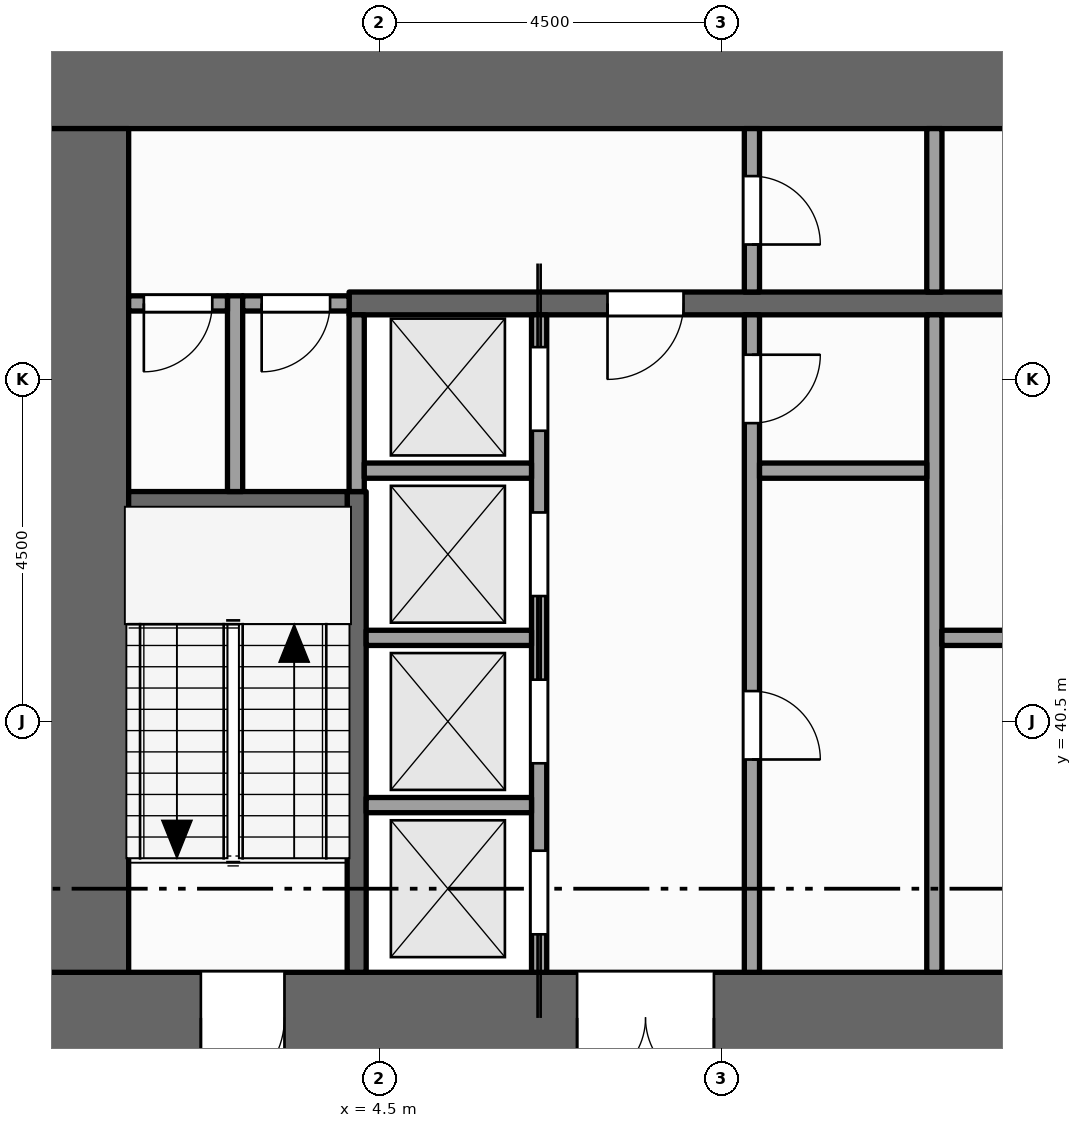
"""IFC4 building model, lengths in metres.
Left out: names, types, materials, properties, quantities, classifications, styles, units other than length and angle.
Written with IfcOpenShell. Run it as: python <this file> out.ifc"""

import sys

from ifc_helpers import new_model, si_unit, direction, frame, frame_2d, origin, place, context, subcontext, project, spatial, rectangle, extrude, element, fill, save


model = new_model("IFC4")
c1 = context("Model", 3, precision=1e-05, world=origin(), true_north=direction((0.0, 1.0)))
c2 = subcontext(c1, "Body", "Model", "MODEL_VIEW")
j1 = project(units=[si_unit("LENGTHUNIT", "METRE"), si_unit("PLANEANGLEUNIT", "RADIAN")], contexts=[c1])
p1 = place(None, origin())
s1 = spatial("IfcSite", under=j1, at=p1, CompositionType="ELEMENT")
p2 = place(p1, origin())
s2 = spatial("IfcBuilding", under=s1, at=p2, CompositionType="ELEMENT")
p3 = place(p2, frame((0.0, 0.0, 29.0)))
s3 = spatial("IfcBuildingStorey", under=s2, at=p3, CompositionType="ELEMENT", Elevation=29.0)
p4 = place(p3, frame((0.0, 36.6, -0.15), z_axis=(0.0, 0.0, 1.0), x_axis=(1.0, 0.0, 0.0)))
e1 = element("IfcWall", 1, at=p4, inside=s3, PredefinedType="SHEAR", context=c2, shape_type="SweptSolid", body=[
    extrude(rectangle(XDim=22.5, YDim=1.2, at=frame_2d((11.25, 0.0))), origin(), (0.0, 0.0, 1.0), 4.0),
])
p5 = place(p4, frame((7.1, 0.0, 0.15)))
e2 = element("IfcOpeningElement", 2, at=p5, cuts=e1, PredefinedType="OPENING", context=c2, shape_type="SweptSolid", body=[
    extrude(rectangle(XDim=1.8, YDim=2.1, at=frame_2d((0.9, 1.05))), frame((0.0, 0.61, 0.0), z_axis=(0.0, -1.0, 0.0), x_axis=(1.0, 0.0, 0.0)), (0.0, 0.0, 1.0), 1.22),
])
p6 = place(p4, frame((13.15, 0.0, 0.15)))
e3 = element("IfcOpeningElement", 3, at=p6, cuts=e1, PredefinedType="OPENING", context=c2, shape_type="SweptSolid", body=[
    extrude(rectangle(XDim=1.1, YDim=2.1, at=frame_2d((0.55, 1.05))), frame((0.0, 0.61, 0.0), z_axis=(0.0, -1.0, 0.0), x_axis=(1.0, 0.0, 0.0)), (0.0, 0.0, 1.0), 1.22),
])
p7 = place(p4, frame((2.15, 0.0, 0.15)))
e4 = element("IfcOpeningElement", 4, at=p7, cuts=e1, PredefinedType="OPENING", context=c2, shape_type="SweptSolid", body=[
    extrude(rectangle(XDim=1.1, YDim=2.1, at=frame_2d((0.55, 1.05))), frame((0.0, 0.61, 0.0), z_axis=(0.0, -1.0, 0.0), x_axis=(1.0, 0.0, 0.0)), (0.0, 0.0, 1.0), 1.22),
])
p8 = place(p4, frame((19.35, 0.0, 0.15)))
e5 = element("IfcOpeningElement", 5, at=p8, cuts=e1, PredefinedType="OPENING", context=c2, shape_type="SweptSolid", body=[
    extrude(rectangle(XDim=1.1, YDim=2.1, at=frame_2d((0.55, 1.05))), frame((0.0, 0.61, 0.0), z_axis=(0.0, -1.0, 0.0), x_axis=(1.0, 0.0, 0.0)), (0.0, 0.0, 1.0), 1.22),
])
p9 = place(p3, frame((0.0, 48.9, -0.15), z_axis=(0.0, 0.0, 1.0), x_axis=(1.0, 0.0, 0.0)))
e6 = element("IfcWall", 6, at=p9, inside=s3, PredefinedType="SHEAR", context=c2, shape_type="SweptSolid", body=[
    extrude(rectangle(XDim=22.5, YDim=1.2, at=frame_2d((11.25, 0.0))), origin(), (0.0, 0.0, 1.0), 4.0),
])
p10 = place(p3, frame((0.6, 37.2, -0.15), z_axis=(0.0, 0.0, 1.0), x_axis=(0.0, 1.0, 0.0)))
e7 = element("IfcWall", 7, at=p10, inside=s3, PredefinedType="SHEAR", context=c2, shape_type="SweptSolid", body=[
    extrude(rectangle(XDim=11.1, YDim=1.2, at=frame_2d((5.55, 0.0))), origin(), (0.0, 0.0, 1.0), 4.0),
])
p11 = place(p3, frame((2.6, 43.525, 0.0), z_axis=(0.0, 0.0, 1.0), x_axis=(0.0, 1.0, 0.0)))
e8 = element("IfcWall", 8, at=p11, inside=s3, PredefinedType="PARTITIONING", context=c2, shape_type="SweptSolid", body=[
    extrude(rectangle(XDim=2.575, YDim=0.2, at=frame_2d((1.288, 0.0))), origin(), (0.0, 0.0, 1.0), 3.85),
])
p12 = place(p3, frame((4.2, 37.2, 0.0), z_axis=(0.0, 0.0, 1.0), x_axis=(0.0, 1.0, 0.0)))
e9 = element("IfcWall", 9, at=p12, inside=s3, PredefinedType="SHEAR", context=c2, shape_type="SweptSolid", body=[
    extrude(rectangle(XDim=6.325, YDim=0.25, at=frame_2d((3.163, 0.0))), origin(), (0.0, 0.0, 1.0), 3.85),
])
p13 = place(p3, frame((4.2, 43.525, 0.0), z_axis=(0.0, 0.0, 1.0), x_axis=(0.0, 1.0, 0.0)))
e10 = element("IfcWall", 10, at=p13, inside=s3, PredefinedType="SOLIDWALL", context=c2, shape_type="SweptSolid", body=[
    extrude(rectangle(XDim=2.325, YDim=0.2, at=frame_2d((1.163, 0.0))), origin(), (0.0, 0.0, 1.0), 3.85),
])
p14 = place(p3, frame((6.6, 37.2, 0.0), z_axis=(0.0, 0.0, 1.0), x_axis=(0.0, 1.0, 0.0)))
e11 = element("IfcWall", 11, at=p14, inside=s3, PredefinedType="SOLIDWALL", context=c2, shape_type="SweptSolid", body=[
    extrude(rectangle(XDim=8.65, YDim=0.2, at=frame_2d((4.325, 0.0))), origin(), (0.0, 0.0, 1.0), 3.85),
])
p15 = place(p14, frame((0.5, 0.0, 0.012)))
e12 = element("IfcOpeningElement", 12, at=p15, cuts=e11, PredefinedType="OPENING", context=c2, shape_type="SweptSolid", body=[
    extrude(rectangle(XDim=1.1, YDim=2.1, at=frame_2d((0.55, 1.05))), frame((0.0, 0.11, 0.0), z_axis=(0.0, -1.0, 0.0), x_axis=(1.0, 0.0, 0.0)), (0.0, 0.0, 1.0), 0.22),
])
p16 = place(p14, frame((2.75, 0.0, 0.012)))
e13 = element("IfcOpeningElement", 13, at=p16, cuts=e11, PredefinedType="OPENING", context=c2, shape_type="SweptSolid", body=[
    extrude(rectangle(XDim=1.1, YDim=2.1, at=frame_2d((0.55, 1.05))), frame((0.0, 0.11, 0.0), z_axis=(0.0, -1.0, 0.0), x_axis=(1.0, 0.0, 0.0)), (0.0, 0.0, 1.0), 0.22),
])
p17 = place(p14, frame((4.95, 0.0, 0.012)))
e14 = element("IfcOpeningElement", 14, at=p17, cuts=e11, PredefinedType="OPENING", context=c2, shape_type="SweptSolid", body=[
    extrude(rectangle(XDim=1.1, YDim=2.1, at=frame_2d((0.55, 1.05))), frame((0.0, 0.11, 0.0), z_axis=(0.0, -1.0, 0.0), x_axis=(1.0, 0.0, 0.0)), (0.0, 0.0, 1.0), 0.22),
])
p18 = place(p14, frame((7.125, 0.0, 0.012)))
e15 = element("IfcOpeningElement", 15, at=p18, cuts=e11, PredefinedType="OPENING", context=c2, shape_type="SweptSolid", body=[
    extrude(rectangle(XDim=1.1, YDim=2.1, at=frame_2d((0.55, 1.05))), frame((0.0, 0.11, 0.0), z_axis=(0.0, -1.0, 0.0), x_axis=(1.0, 0.0, 0.0)), (0.0, 0.0, 1.0), 0.22),
])
p19 = place(p3, frame((9.4, 37.2, 0.0), z_axis=(0.0, 0.0, 1.0), x_axis=(0.0, 1.0, 0.0)))
e16 = element("IfcWall", 16, at=p19, inside=s3, PredefinedType="PARTITIONING", context=c2, shape_type="SweptSolid", body=[
    extrude(rectangle(XDim=8.65, YDim=0.2, at=frame_2d((4.325, 0.0))), origin(), (0.0, 0.0, 1.0), 3.85),
])
p20 = place(p19, frame((2.8, 0.0, 0.0)))
e17 = element("IfcOpeningElement", 17, at=p20, cuts=e16, PredefinedType="OPENING", context=c2, shape_type="SweptSolid", body=[
    extrude(rectangle(XDim=0.9, YDim=2.1, at=frame_2d((0.45, 1.05))), frame((0.0, 0.11, 0.0), z_axis=(0.0, -1.0, 0.0), x_axis=(1.0, 0.0, 0.0)), (0.0, 0.0, 1.0), 0.22),
])
p21 = place(p19, frame((7.225, 0.0, 0.0)))
e18 = element("IfcOpeningElement", 18, at=p21, cuts=e16, PredefinedType="OPENING", context=c2, shape_type="SweptSolid", body=[
    extrude(rectangle(XDim=0.9, YDim=2.1, at=frame_2d((0.45, 1.05))), frame((0.0, 0.11, 0.0), z_axis=(0.0, -1.0, 0.0), x_axis=(1.0, 0.0, 0.0)), (0.0, 0.0, 1.0), 0.22),
])
p22 = place(p3, frame((9.4, 46.15, 0.0), z_axis=(0.0, 0.0, 1.0), x_axis=(0.0, 1.0, 0.0)))
e19 = element("IfcWall", 19, at=p22, inside=s3, PredefinedType="PARTITIONING", context=c2, shape_type="SweptSolid", body=[
    extrude(rectangle(XDim=2.15, YDim=0.2, at=frame_2d((1.075, 0.0))), origin(), (0.0, 0.0, 1.0), 3.85),
])
p23 = place(p22, frame((0.625, 0.0, 0.0)))
e20 = element("IfcOpeningElement", 20, at=p23, cuts=e19, PredefinedType="OPENING", context=c2, shape_type="SweptSolid", body=[
    extrude(rectangle(XDim=0.9, YDim=2.1, at=frame_2d((0.45, 1.05))), frame((0.0, 0.11, 0.0), z_axis=(0.0, -1.0, 0.0), x_axis=(1.0, 0.0, 0.0)), (0.0, 0.0, 1.0), 0.22),
])
p24 = place(p3, frame((11.8, 37.2, 0.0), z_axis=(0.0, 0.0, 1.0), x_axis=(0.0, 1.0, 0.0)))
e21 = element("IfcWall", 21, at=p24, inside=s3, PredefinedType="PARTITIONING", context=c2, shape_type="SweptSolid", body=[
    extrude(rectangle(XDim=8.65, YDim=0.2, at=frame_2d((4.325, 0.0))), origin(), (0.0, 0.0, 1.0), 3.85),
])
p25 = place(p3, frame((11.8, 46.15, 0.0), z_axis=(0.0, 0.0, 1.0), x_axis=(0.0, 1.0, 0.0)))
e22 = element("IfcWall", 22, at=p25, inside=s3, PredefinedType="PARTITIONING", context=c2, shape_type="SweptSolid", body=[
    extrude(rectangle(XDim=2.15, YDim=0.2, at=frame_2d((1.075, 0.0))), origin(), (0.0, 0.0, 1.0), 3.85),
])
for number, where, z_axis, x_axis in (
    (23, (4.325, 39.4, 0.0), (0.0, 0.0, 1.0), (1.0, 0.0, 0.0)),
    (24, (4.325, 41.6, 0.0), (0.0, 0.0, 1.0), (1.0, 0.0, 0.0)),
):
    element("IfcWall", number, at=place(p3, frame(where, z_axis=z_axis, x_axis=x_axis)), inside=s3, PredefinedType="SOLIDWALL", context=c2, shape_type="SweptSolid", body=[
        extrude(rectangle(XDim=2.175, YDim=0.2, at=frame_2d((1.087, 0.0))), origin(), (0.0, 0.0, 1.0), 3.85),
    ])
p26 = place(p3, frame((11.9, 41.6, 0.0), z_axis=(0.0, 0.0, 1.0), x_axis=(1.0, 0.0, 0.0)))
e25 = element("IfcWall", 25, at=p26, inside=s3, PredefinedType="PARTITIONING", context=c2, shape_type="SweptSolid", body=[
    extrude(rectangle(XDim=3.6, YDim=0.2, at=frame_2d((1.8, 0.0))), origin(), (0.0, 0.0, 1.0), 3.85),
])
p27 = place(p26, frame((1.3, 0.0, 0.0)))
e26 = element("IfcOpeningElement", 26, at=p27, cuts=e25, PredefinedType="OPENING", context=c2, shape_type="SweptSolid", body=[
    extrude(rectangle(XDim=1.0, YDim=2.1, at=frame_2d((0.5, 1.05))), frame((0.0, 0.11, 0.0), z_axis=(0.0, -1.0, 0.0), x_axis=(1.0, 0.0, 0.0)), (0.0, 0.0, 1.0), 0.22),
])
p28 = place(p3, frame((1.2, 43.4, 0.0), z_axis=(0.0, 0.0, 1.0), x_axis=(1.0, 0.0, 0.0)))
e27 = element("IfcWall", 27, at=p28, inside=s3, PredefinedType="SHEAR", context=c2, shape_type="SweptSolid", body=[
    extrude(rectangle(XDim=2.875, YDim=0.25, at=frame_2d((1.438, 0.0))), origin(), (0.0, 0.0, 1.0), 3.85),
])
p29 = place(p3, frame((4.3, 43.8, 0.0), z_axis=(0.0, 0.0, 1.0), x_axis=(1.0, 0.0, 0.0)))
e28 = element("IfcWall", 28, at=p29, inside=s3, PredefinedType="SOLIDWALL", context=c2, shape_type="SweptSolid", body=[
    extrude(rectangle(XDim=2.2, YDim=0.2, at=frame_2d((1.1, 0.0))), origin(), (0.0, 0.0, 1.0), 3.85),
])
p30 = place(p3, frame((9.5, 43.8, 0.0), z_axis=(0.0, 0.0, 1.0), x_axis=(1.0, 0.0, 0.0)))
e29 = element("IfcWall", 29, at=p30, inside=s3, PredefinedType="PARTITIONING", context=c2, shape_type="SweptSolid", body=[
    extrude(rectangle(XDim=2.2, YDim=0.2, at=frame_2d((1.1, 0.0))), origin(), (0.0, 0.0, 1.0), 3.85),
])
p31 = place(p3, frame((1.2, 46.0, 0.0), z_axis=(0.0, 0.0, 1.0), x_axis=(1.0, 0.0, 0.0)))
e30 = element("IfcWall", 30, at=p31, inside=s3, PredefinedType="PARTITIONING", context=c2, shape_type="SweptSolid", body=[
    extrude(rectangle(XDim=1.3, YDim=0.2, at=frame_2d((0.65, 0.0))), origin(), (0.0, 0.0, 1.0), 3.85),
])
p32 = place(p31, frame((0.2, 0.0, 0.0)))
e31 = element("IfcOpeningElement", 31, at=p32, cuts=e30, PredefinedType="OPENING", context=c2, shape_type="SweptSolid", body=[
    extrude(rectangle(XDim=0.9, YDim=2.1, at=frame_2d((0.45, 1.05))), frame((0.0, 0.11, 0.0), z_axis=(0.0, -1.0, 0.0), x_axis=(1.0, 0.0, 0.0)), (0.0, 0.0, 1.0), 0.22),
])
p33 = place(p3, frame((2.7, 46.0, 0.0), z_axis=(0.0, 0.0, 1.0), x_axis=(1.0, 0.0, 0.0)))
e32 = element("IfcWall", 32, at=p33, inside=s3, PredefinedType="PARTITIONING", context=c2, shape_type="SweptSolid", body=[
    extrude(rectangle(XDim=1.4, YDim=0.2, at=frame_2d((0.7, 0.0))), origin(), (0.0, 0.0, 1.0), 3.85),
])
p34 = place(p33, frame((0.25, 0.0, 0.0)))
e33 = element("IfcOpeningElement", 33, at=p34, cuts=e32, PredefinedType="OPENING", context=c2, shape_type="SweptSolid", body=[
    extrude(rectangle(XDim=0.9, YDim=2.1, at=frame_2d((0.45, 1.05))), frame((0.0, 0.11, 0.0), z_axis=(0.0, -1.0, 0.0), x_axis=(1.0, 0.0, 0.0)), (0.0, 0.0, 1.0), 0.22),
])
p35 = place(p3, frame((4.1, 46.0, 0.0), z_axis=(0.0, 0.0, 1.0), x_axis=(1.0, 0.0, 0.0)))
e34 = element("IfcWall", 34, at=p35, inside=s3, PredefinedType="SHEAR", context=c2, shape_type="SweptSolid", body=[
    extrude(rectangle(XDim=14.5, YDim=0.3, at=frame_2d((7.25, 0.0))), origin(), (0.0, 0.0, 1.0), 3.85),
])
p36 = place(p35, frame((3.4, 0.0, 0.0)))
e35 = element("IfcOpeningElement", 35, at=p36, cuts=e34, PredefinedType="OPENING", context=c2, shape_type="SweptSolid", body=[
    extrude(rectangle(XDim=1.0, YDim=2.1, at=frame_2d((0.5, 1.05))), frame((0.0, 0.16, 0.0), z_axis=(0.0, -1.0, 0.0), x_axis=(1.0, 0.0, 0.0)), (0.0, 0.0, 1.0), 0.32),
])
p37 = place(p35, frame((9.1, 0.0, 0.0)))
e36 = element("IfcOpeningElement", 36, at=p37, cuts=e34, PredefinedType="OPENING", context=c2, shape_type="SweptSolid", body=[
    extrude(rectangle(XDim=1.0, YDim=2.1, at=frame_2d((0.5, 1.05))), frame((0.0, 0.16, 0.0), z_axis=(0.0, -1.0, 0.0), x_axis=(1.0, 0.0, 0.0)), (0.0, 0.0, 1.0), 0.32),
])
p38 = place(p15, origin())
e37 = element("IfcDoor", 37, at=p38, inside=s3, OperationType="SLIDING_TO_LEFT", PredefinedType="DOOR", context=c2, shape_type="SweptSolid", body=[
    extrude(rectangle(XDim=1.1, YDim=2.1, at=frame_2d((0.55, 1.05))), frame((0.0, 0.025, 0.0), z_axis=(0.0, -1.0, 0.0), x_axis=(1.0, 0.0, 0.0)), (0.0, 0.0, 1.0), 0.05),
])
fill(e12, e37)
p39 = place(p16, origin())
e38 = element("IfcDoor", 38, at=p39, inside=s3, OperationType="SLIDING_TO_RIGHT", PredefinedType="DOOR", context=c2, shape_type="SweptSolid", body=[
    extrude(rectangle(XDim=1.1, YDim=2.1, at=frame_2d((0.55, 1.05))), frame((0.0, 0.025, 0.0), z_axis=(0.0, -1.0, 0.0), x_axis=(1.0, 0.0, 0.0)), (0.0, 0.0, 1.0), 0.05),
])
fill(e13, e38)
p40 = place(p17, origin())
e39 = element("IfcDoor", 39, at=p40, inside=s3, OperationType="SLIDING_TO_LEFT", PredefinedType="DOOR", context=c2, shape_type="SweptSolid", body=[
    extrude(rectangle(XDim=1.1, YDim=2.1, at=frame_2d((0.55, 1.05))), frame((0.0, 0.025, 0.0), z_axis=(0.0, -1.0, 0.0), x_axis=(1.0, 0.0, 0.0)), (0.0, 0.0, 1.0), 0.05),
])
fill(e14, e39)
p41 = place(p18, origin())
e40 = element("IfcDoor", 40, at=p41, inside=s3, OperationType="SLIDING_TO_RIGHT", PredefinedType="DOOR", context=c2, shape_type="SweptSolid", body=[
    extrude(rectangle(XDim=1.1, YDim=2.1, at=frame_2d((0.55, 1.05))), frame((0.0, 0.025, 0.0), z_axis=(0.0, -1.0, 0.0), x_axis=(1.0, 0.0, 0.0)), (0.0, 0.0, 1.0), 0.05),
])
fill(e15, e40)
p42 = place(p5, origin())
e41 = element("IfcDoor", 41, at=p42, inside=s3, OperationType="DOUBLE_DOOR_SINGLE_SWING", PredefinedType="DOOR", context=c2, shape_type="SweptSolid", body=[
    extrude(rectangle(XDim=1.8, YDim=2.1, at=frame_2d((0.9, 1.05))), frame((0.0, 0.025, 0.0), z_axis=(0.0, -1.0, 0.0), x_axis=(1.0, 0.0, 0.0)), (0.0, 0.0, 1.0), 0.05),
])
fill(e2, e41)
p43 = place(p36, origin())
e42 = element("IfcDoor", 42, at=p43, inside=s3, OperationType="SINGLE_SWING_LEFT", PredefinedType="DOOR", context=c2, shape_type="SweptSolid", body=[
    extrude(rectangle(XDim=1.0, YDim=2.1, at=frame_2d((0.5, 1.05))), frame((0.0, 0.025, 0.0), z_axis=(0.0, -1.0, 0.0), x_axis=(1.0, 0.0, 0.0)), (0.0, 0.0, 1.0), 0.05),
])
fill(e35, e42)
p44 = place(p23, origin())
e43 = element("IfcDoor", 43, at=p44, inside=s3, OperationType="SINGLE_SWING_LEFT", PredefinedType="DOOR", context=c2, shape_type="SweptSolid", body=[
    extrude(rectangle(XDim=0.9, YDim=2.1, at=frame_2d((0.45, 1.05))), frame((0.0, 0.025, 0.0), z_axis=(0.0, -1.0, 0.0), x_axis=(1.0, 0.0, 0.0)), (0.0, 0.0, 1.0), 0.05),
])
fill(e20, e43)
p45 = place(p7, origin())
e44 = element("IfcDoor", 44, at=p45, inside=s3, OperationType="SINGLE_SWING_LEFT", PredefinedType="DOOR", context=c2, shape_type="SweptSolid", body=[
    extrude(rectangle(XDim=1.1, YDim=2.1, at=frame_2d((0.55, 1.05))), frame((0.0, 0.025, 0.0), z_axis=(0.0, -1.0, 0.0), x_axis=(1.0, 0.0, 0.0)), (0.0, 0.0, 1.0), 0.05),
])
fill(e4, e44)
p46 = place(p32, origin())
e45 = element("IfcDoor", 45, at=p46, inside=s3, OperationType="SINGLE_SWING_LEFT", PredefinedType="DOOR", context=c2, shape_type="SweptSolid", body=[
    extrude(rectangle(XDim=0.9, YDim=2.1, at=frame_2d((0.45, 1.05))), frame((0.0, 0.025, 0.0), z_axis=(0.0, -1.0, 0.0), x_axis=(1.0, 0.0, 0.0)), (0.0, 0.0, 1.0), 0.05),
])
fill(e31, e45)
p47 = place(p34, origin())
e46 = element("IfcDoor", 46, at=p47, inside=s3, OperationType="SINGLE_SWING_LEFT", PredefinedType="DOOR", context=c2, shape_type="SweptSolid", body=[
    extrude(rectangle(XDim=0.9, YDim=2.1, at=frame_2d((0.45, 1.05))), frame((0.0, 0.025, 0.0), z_axis=(0.0, -1.0, 0.0), x_axis=(1.0, 0.0, 0.0)), (0.0, 0.0, 1.0), 0.05),
])
fill(e33, e46)
p48 = place(p20, origin())
e47 = element("IfcDoor", 47, at=p48, inside=s3, OperationType="SINGLE_SWING_LEFT", PredefinedType="DOOR", context=c2, shape_type="SweptSolid", body=[
    extrude(rectangle(XDim=0.9, YDim=2.1, at=frame_2d((0.45, 1.05))), frame((0.0, 0.025, 0.0), z_axis=(0.0, -1.0, 0.0), x_axis=(1.0, 0.0, 0.0)), (0.0, 0.0, 1.0), 0.05),
])
fill(e17, e47)
p49 = place(p21, origin())
e48 = element("IfcDoor", 48, at=p49, inside=s3, OperationType="SINGLE_SWING_RIGHT", PredefinedType="DOOR", context=c2, shape_type="SweptSolid", body=[
    extrude(rectangle(XDim=0.9, YDim=2.1, at=frame_2d((0.45, 1.05))), frame((0.0, 0.025, 0.0), z_axis=(0.0, -1.0, 0.0), x_axis=(1.0, 0.0, 0.0)), (0.0, 0.0, 1.0), 0.05),
])
fill(e18, e48)
save(model, sys.argv[1])
